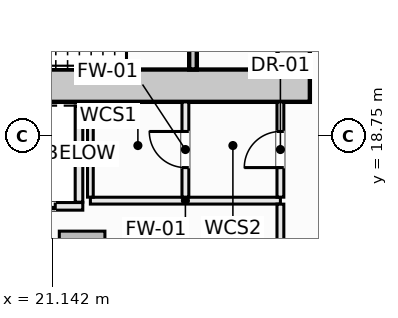
"""IFC4 building model, lengths in metres.
Left out: names, types, materials, properties, quantities, classifications, styles, units other than length and angle.
Written with IfcOpenShell. Run it as: python <this file> out.ifc"""

import sys

from ifc_helpers import new_model, si_unit, direction, frame, frame_2d, origin, origin_2d, place, context, subcontext, project, spatial, rectangle, extrude, element, fill, save


model = new_model("IFC4")
c1 = context("Model", 3, precision=1e-05, world=origin(), true_north=direction((0.0, 1.0)))
c2 = subcontext(c1, "Body", "Model", "MODEL_VIEW")
j1 = project(units=[si_unit("LENGTHUNIT", "METRE"), si_unit("PLANEANGLEUNIT", "RADIAN")], contexts=[c1])
p1 = place(None, origin())
s1 = spatial("IfcSite", under=j1, at=p1, CompositionType="ELEMENT")
p2 = place(p1, origin())
s2 = spatial("IfcBuilding", under=s1, at=p2, CompositionType="ELEMENT")
p3 = place(p2, frame((0.0, 0.0, 15.0)))
s3 = spatial("IfcBuildingStorey", under=s2, at=p3, CompositionType="ELEMENT", Elevation=15.0)
p4 = place(p3, frame((14.075, 20.075, -0.24), z_axis=(0.0, 0.0, 1.0), x_axis=(1.0, 0.0, 0.0)))
e1 = element("IfcWall", 1, at=p4, inside=s3, PredefinedType="SHEAR", context=c2, shape_type="SweptSolid", body=[
    extrude(rectangle(XDim=13.85, YDim=0.85, at=frame_2d((6.925, 0.0))), origin(), (0.0, 0.0, 1.0), 6.0),
])
p5 = place(p3, frame((27.5, 20.55, -0.24), z_axis=(0.0, 0.0, 1.0), x_axis=(0.0, 1.0, 0.0)))
e2 = element("IfcWall", 2, at=p5, inside=s3, PredefinedType="SHEAR", context=c2, shape_type="SweptSolid", body=[
    extrude(rectangle(XDim=1.5, YDim=0.85, at=frame_2d((0.75, 0.0))), origin(), (0.0, 0.0, 1.0), 6.0),
])
p6 = place(p3, frame((21.932, 15.648, -0.24), z_axis=(0.0, 0.0, 1.0), x_axis=(1.0, 0.0, 0.0)))
e3 = element("IfcColumn", 3, at=p6, inside=s3, PredefinedType="COLUMN", context=c2, shape_type="SweptSolid", body=[
    extrude(rectangle(XDim=1.2, YDim=1.2, at=origin_2d()), origin(), (0.0, 0.0, 1.0), 6.0),
])
p7 = place(p3, frame((24.85, 20.502, -0.24), z_axis=(0.0, 0.0, 1.0), x_axis=(0.0, 1.0, 0.0)))
e4 = element("IfcWall", 4, at=p7, inside=s3, PredefinedType="SHEAR", context=c2, shape_type="SweptSolid", body=[
    extrude(rectangle(XDim=3.038, YDim=0.2, at=frame_2d((1.519, 0.0))), origin(), (0.0, 0.0, 1.0), 6.0),
])
p8 = place(p7, frame((0.969, 0.0, 0.24)))
e5 = element("IfcOpeningElement", 5, at=p8, cuts=e4, PredefinedType="OPENING", context=c2, shape_type="SweptSolid", body=[
    extrude(rectangle(XDim=1.1, YDim=2.15, at=frame_2d((0.55, 1.075))), frame((0.0, 0.11, 0.0), z_axis=(0.0, -1.0, 0.0), x_axis=(1.0, 0.0, 0.0)), (0.0, 0.0, 1.0), 0.22),
])
p9 = place(p3, frame((19.4, 16.9, 0.0), z_axis=(0.0, 0.0, 1.0), x_axis=(1.0, 0.0, 0.0)))
e6 = element("IfcWall", 6, at=p9, inside=s3, PredefinedType="SOLIDWALL", context=c2, shape_type="SweptSolid", body=[
    extrude(rectangle(XDim=2.55, YDim=0.2, at=frame_2d((1.275, 0.0))), origin(), (0.0, 0.0, 1.0), 5.76),
])
p10 = place(p9, frame((0.725, 0.0, 0.0)))
e7 = element("IfcOpeningElement", 7, at=p10, cuts=e6, PredefinedType="OPENING", context=c2, shape_type="SweptSolid", body=[
    extrude(rectangle(XDim=1.1, YDim=2.2, at=frame_2d((0.55, 1.1))), frame((0.0, 0.11, 0.0), z_axis=(0.0, -1.0, 0.0), x_axis=(1.0, 0.0, 0.0)), (0.0, 0.0, 1.0), 0.22),
])
p11 = place(p3, frame((21.85, 17.01, 0.0), z_axis=(0.0, 0.0, 1.0), x_axis=(0.0, 1.0, 0.0)))
e8 = element("IfcWall", 8, at=p11, inside=s3, PredefinedType="SOLIDWALL", context=c2, shape_type="SweptSolid", body=[
    extrude(rectangle(XDim=2.53, YDim=0.2, at=frame_2d((1.265, 0.0))), origin(), (0.0, 0.0, 1.0), 5.76),
])
p12 = place(p3, frame((22.15, 17.05, 0.0), z_axis=(0.0, 0.0, 1.0), x_axis=(1.0, 0.0, 0.0)))
e9 = element("IfcWall", 9, at=p12, inside=s3, PredefinedType="SOLIDWALL", context=c2, shape_type="SweptSolid", body=[
    extrude(rectangle(XDim=5.0, YDim=0.18, at=frame_2d((2.5, 0.0))), origin(), (0.0, 0.0, 1.0), 5.76),
])
p13 = place(p3, frame((22.15, 17.142, 0.0), z_axis=(0.0, 0.0, 1.0), x_axis=(0.0, 1.0, 0.0)))
e10 = element("IfcWall", 10, at=p13, inside=s3, PredefinedType="PARTITIONING", context=c2, shape_type="SweptSolid", body=[
    extrude(rectangle(XDim=2.506, YDim=0.15, at=frame_2d((1.253, 0.0))), origin(), (0.0, 0.0, 1.0), 5.76),
])
p14 = place(p3, frame((24.65, 17.142, 0.0), z_axis=(0.0, 0.0, 1.0), x_axis=(0.0, 1.0, 0.0)))
e11 = element("IfcWall", 11, at=p14, inside=s3, PredefinedType="SOLIDWALL", context=c2, shape_type="SweptSolid", body=[
    extrude(rectangle(XDim=2.506, YDim=0.18, at=frame_2d((1.253, 0.0))), origin(), (0.0, 0.0, 1.0), 5.76),
])
p15 = place(p14, frame((0.778, 0.0, 0.0)))
e12 = element("IfcOpeningElement", 12, at=p15, cuts=e11, PredefinedType="OPENING", context=c2, shape_type="SweptSolid", body=[
    extrude(rectangle(XDim=0.95, YDim=2.1, at=frame_2d((0.475, 1.05))), frame((0.0, 0.1, 0.0), z_axis=(0.0, -1.0, 0.0), x_axis=(1.0, 0.0, 0.0)), (0.0, 0.0, 1.0), 0.2),
])
p16 = place(p3, frame((27.15, 11.75, 0.0), z_axis=(0.0, 0.0, 1.0), x_axis=(0.0, 1.0, 0.0)))
e13 = element("IfcWall", 13, at=p16, inside=s3, PredefinedType="SOLIDWALL", context=c2, shape_type="SweptSolid", body=[
    extrude(rectangle(XDim=5.208, YDim=0.18, at=frame_2d((2.604, 0.0))), origin(), (0.0, 0.0, 1.0), 5.76),
])
p17 = place(p3, frame((27.15, 17.142, 0.0), z_axis=(0.0, 0.0, 1.0), x_axis=(0.0, 1.0, 0.0)))
e14 = element("IfcWall", 14, at=p17, inside=s3, PredefinedType="SOLIDWALL", context=c2, shape_type="SweptSolid", body=[
    extrude(rectangle(XDim=2.506, YDim=0.18, at=frame_2d((1.253, 0.0))), origin(), (0.0, 0.0, 1.0), 5.76),
])
p18 = place(p17, frame((0.778, 0.0, 0.0)))
e15 = element("IfcOpeningElement", 15, at=p18, cuts=e14, PredefinedType="OPENING", context=c2, shape_type="SweptSolid", body=[
    extrude(rectangle(XDim=0.95, YDim=2.1, at=frame_2d((0.475, 1.05))), frame((0.0, 0.1, 0.0), z_axis=(0.0, -1.0, 0.0), x_axis=(1.0, 0.0, 0.0)), (0.0, 0.0, 1.0), 0.2),
])
p19 = place(p10, origin())
e16 = element("IfcDoor", 16, at=p19, inside=s3, OperationType="SLIDING_TO_LEFT", PredefinedType="DOOR", context=c2, shape_type="SweptSolid", body=[
    extrude(rectangle(XDim=1.1, YDim=2.2, at=frame_2d((0.55, 1.1))), frame((0.0, 0.025, 0.0), z_axis=(0.0, -1.0, 0.0), x_axis=(1.0, 0.0, 0.0)), (0.0, 0.0, 1.0), 0.05),
])
fill(e7, e16)
p20 = place(p18, origin())
e17 = element("IfcDoor", 17, at=p20, inside=s3, OperationType="SINGLE_SWING_LEFT", PredefinedType="DOOR", context=c2, shape_type="SweptSolid", body=[
    extrude(rectangle(XDim=0.95, YDim=2.1, at=frame_2d((0.475, 1.05))), frame((0.0, 0.025, 0.0), z_axis=(0.0, -1.0, 0.0), x_axis=(1.0, 0.0, 0.0)), (0.0, 0.0, 1.0), 0.05),
])
fill(e15, e17)
p21 = place(p15, origin())
e18 = element("IfcDoor", 18, at=p21, inside=s3, OperationType="SINGLE_SWING_RIGHT", PredefinedType="DOOR", context=c2, shape_type="SweptSolid", body=[
    extrude(rectangle(XDim=0.95, YDim=2.1, at=frame_2d((0.475, 1.05))), frame((0.0, 0.025, 0.0), z_axis=(0.0, -1.0, 0.0), x_axis=(1.0, 0.0, 0.0)), (0.0, 0.0, 1.0), 0.05),
])
fill(e12, e18)
save(model, sys.argv[1])
